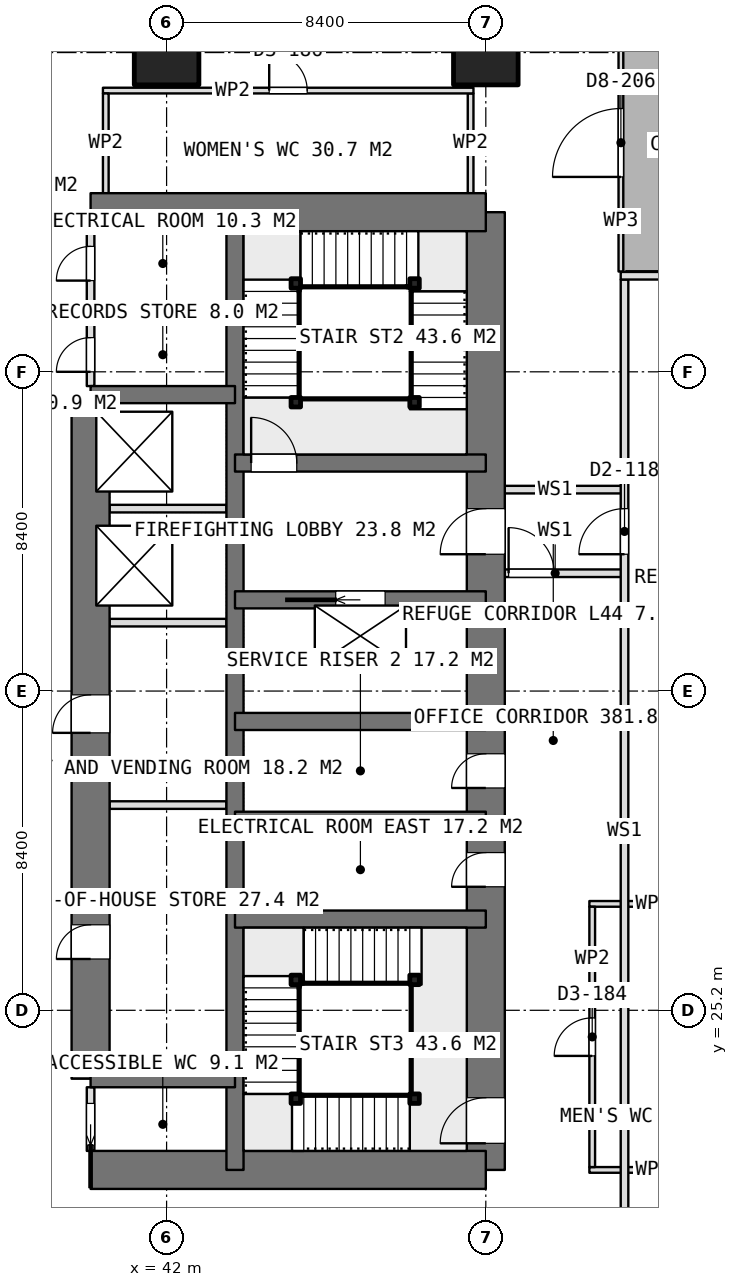
"""IFC4 building model, lengths in metres.
Left out: names, types, materials, properties, quantities, classifications, styles, units other than length and angle.
Written with IfcOpenShell. Run it as: python <this file> out.ifc"""

import sys

from ifc_helpers import new_model, si_unit, direction, frame, frame_2d, origin, origin_2d, place, context, subcontext, project, spatial, rectangle, extrude, element, fill, save


model = new_model("IFC4")
c1 = context("Model", 3, precision=1e-05, world=origin(), true_north=direction((0.0, 1.0)))
c2 = subcontext(c1, "Body", "Model", "MODEL_VIEW")
j1 = project(units=[si_unit("LENGTHUNIT", "METRE"), si_unit("PLANEANGLEUNIT", "RADIAN")], contexts=[c1])
p1 = place(None, origin())
s1 = spatial("IfcSite", under=j1, at=p1, CompositionType="ELEMENT")
p2 = place(p1, origin())
s2 = spatial("IfcBuilding", under=s1, at=p2, CompositionType="ELEMENT")
p3 = place(p2, frame((0.0, 0.0, 176.45)))
s3 = spatial("IfcBuildingStorey", under=s2, at=p3, CompositionType="ELEMENT", Elevation=176.45)
for number, where, z_axis, x_axis in (
    (1, (40.0, 21.0, 0.0), (0.0, 0.0, 1.0), (1.0, 0.0, 0.0)),
    (2, (40.0, 46.2, 0.0), (0.0, 0.0, 1.0), (1.0, 0.0, 0.0)),
):
    element("IfcWall", number, at=place(p3, frame(where, z_axis=z_axis, x_axis=x_axis)), inside=s3, PredefinedType="SHEAR", context=c2, shape_type="SweptSolid", body=[
        extrude(rectangle(XDim=10.4, YDim=1.0, at=frame_2d((5.2, 0.0))), origin(), (0.0, 0.0, 1.0), 3.75),
    ])
p4 = place(p3, frame((50.4, 21.0, 0.0), z_axis=(0.0, 0.0, 1.0), x_axis=(0.0, 1.0, 0.0)))
e3 = element("IfcWall", 3, at=p4, inside=s3, PredefinedType="SHEAR", context=c2, shape_type="SweptSolid", body=[
    extrude(rectangle(XDim=25.2, YDim=1.0, at=frame_2d((12.6, 0.0))), origin(), (0.0, 0.0, 1.0), 3.75),
])
p5 = place(p4, frame((16.2, 0.0, 0.0)))
e4 = element("IfcOpeningElement", 4, at=p5, cuts=e3, PredefinedType="OPENING", context=c2, shape_type="SweptSolid", body=[
    extrude(rectangle(XDim=1.2, YDim=2.1, at=frame_2d((0.6, 1.05))), frame((0.0, 0.51, 0.0), z_axis=(0.0, -1.0, 0.0), x_axis=(1.0, 0.0, 0.0)), (0.0, 0.0, 1.0), 1.02),
])
p6 = place(p4, frame((10.05, 0.0, 0.0)))
e5 = element("IfcOpeningElement", 5, at=p6, cuts=e3, PredefinedType="OPENING", context=c2, shape_type="SweptSolid", body=[
    extrude(rectangle(XDim=0.9, YDim=2.1, at=frame_2d((0.45, 1.05))), frame((0.0, 0.51, 0.0), z_axis=(0.0, -1.0, 0.0), x_axis=(1.0, 0.0, 0.0)), (0.0, 0.0, 1.0), 1.02),
])
p7 = place(p4, frame((7.45, 0.0, 0.0)))
e6 = element("IfcOpeningElement", 6, at=p7, cuts=e3, PredefinedType="OPENING", context=c2, shape_type="SweptSolid", body=[
    extrude(rectangle(XDim=0.9, YDim=2.1, at=frame_2d((0.45, 1.05))), frame((0.0, 0.51, 0.0), z_axis=(0.0, -1.0, 0.0), x_axis=(1.0, 0.0, 0.0)), (0.0, 0.0, 1.0), 1.02),
])
p8 = place(p4, frame((0.7, 0.0, 0.0)))
e7 = element("IfcOpeningElement", 7, at=p8, cuts=e3, PredefinedType="OPENING", context=c2, shape_type="SweptSolid", body=[
    extrude(rectangle(XDim=1.2, YDim=2.1, at=frame_2d((0.6, 1.05))), frame((0.0, 0.51, 0.0), z_axis=(0.0, -1.0, 0.0), x_axis=(1.0, 0.0, 0.0)), (0.0, 0.0, 1.0), 1.02),
])
p9 = place(p3, frame((43.8, 21.0, 0.0), z_axis=(0.0, 0.0, 1.0), x_axis=(0.0, 1.0, 0.0)))
e8 = element("IfcWall", 8, at=p9, inside=s3, PredefinedType="SHEAR", context=c2, shape_type="SweptSolid", body=[
    extrude(rectangle(XDim=25.2, YDim=0.45, at=frame_2d((12.6, 0.0))), origin(), (0.0, 0.0, 1.0), 3.75),
])
p10 = place(p3, frame((40.0, 23.4, 0.0), z_axis=(0.0, 0.0, 1.0), x_axis=(0.0, 1.0, 0.0)))
e9 = element("IfcWall", 9, at=p10, inside=s3, PredefinedType="SHEAR", context=c2, shape_type="SweptSolid", body=[
    extrude(rectangle(XDim=18.0, YDim=1.0, at=frame_2d((9.0, 0.0))), origin(), (0.0, 0.0, 1.0), 3.75),
])
p11 = place(p10, frame((3.15, 0.0, 0.0)))
e10 = element("IfcOpeningElement", 10, at=p11, cuts=e9, PredefinedType="OPENING", context=c2, shape_type="SweptSolid", body=[
    extrude(rectangle(XDim=0.9, YDim=2.1, at=frame_2d((0.45, 1.05))), frame((0.0, 0.51, 0.0), z_axis=(0.0, -1.0, 0.0), x_axis=(1.0, 0.0, 0.0)), (0.0, 0.0, 1.0), 1.02),
])
p12 = place(p10, frame((9.1, 0.0, 0.0)))
e11 = element("IfcOpeningElement", 11, at=p12, cuts=e9, PredefinedType="OPENING", context=c2, shape_type="SweptSolid", body=[
    extrude(rectangle(XDim=1.0, YDim=2.1, at=frame_2d((0.5, 1.05))), frame((0.0, 0.51, 0.0), z_axis=(0.0, -1.0, 0.0), x_axis=(1.0, 0.0, 0.0)), (0.0, 0.0, 1.0), 1.02),
])
for number, where, z_axis, x_axis in (
    (12, (40.0, 23.4, 0.0), (0.0, 0.0, 1.0), (1.0, 0.0, 0.0)),
    (13, (40.0, 41.4, 0.0), (0.0, 0.0, 1.0), (1.0, 0.0, 0.0)),
):
    element("IfcWall", number, at=place(p3, frame(where, z_axis=z_axis, x_axis=x_axis)), inside=s3, PredefinedType="SHEAR", context=c2, shape_type="SweptSolid", body=[
        extrude(rectangle(XDim=3.8, YDim=0.45, at=frame_2d((1.9, 0.0))), origin(), (0.0, 0.0, 1.0), 3.75),
    ])
for number, where, z_axis, x_axis in (
    (14, (43.8, 27.6, 0.0), (0.0, 0.0, 1.0), (1.0, 0.0, 0.0)),
    (15, (43.8, 30.2, 0.0), (0.0, 0.0, 1.0), (1.0, 0.0, 0.0)),
    (16, (43.8, 32.8, 0.0), (0.0, 0.0, 1.0), (1.0, 0.0, 0.0)),
):
    element("IfcWall", number, at=place(p3, frame(where, z_axis=z_axis, x_axis=x_axis)), inside=s3, PredefinedType="SHEAR", context=c2, shape_type="SweptSolid", body=[
        extrude(rectangle(XDim=6.6, YDim=0.45, at=frame_2d((3.3, 0.0))), origin(), (0.0, 0.0, 1.0), 3.75),
    ])
p13 = place(p3, frame((43.8, 36.0, 0.0), z_axis=(0.0, 0.0, 1.0), x_axis=(1.0, 0.0, 0.0)))
e17 = element("IfcWall", 17, at=p13, inside=s3, PredefinedType="SHEAR", context=c2, shape_type="SweptSolid", body=[
    extrude(rectangle(XDim=6.6, YDim=0.45, at=frame_2d((3.3, 0.0))), origin(), (0.0, 0.0, 1.0), 3.75),
])
p14 = place(p13, frame((2.65, 0.0, 0.0)))
e18 = element("IfcOpeningElement", 18, at=p14, cuts=e17, PredefinedType="OPENING", context=c2, shape_type="SweptSolid", body=[
    extrude(rectangle(XDim=1.3, YDim=2.1, at=frame_2d((0.65, 1.05))), frame((0.0, 0.235, 0.0), z_axis=(0.0, -1.0, 0.0), x_axis=(1.0, 0.0, 0.0)), (0.0, 0.0, 1.0), 0.47),
])
p15 = place(p3, frame((43.8, 39.6, 0.0), z_axis=(0.0, 0.0, 1.0), x_axis=(1.0, 0.0, 0.0)))
e19 = element("IfcWall", 19, at=p15, inside=s3, PredefinedType="SHEAR", context=c2, shape_type="SweptSolid", body=[
    extrude(rectangle(XDim=6.6, YDim=0.45, at=frame_2d((3.3, 0.0))), origin(), (0.0, 0.0, 1.0), 3.75),
])
p16 = place(p15, frame((0.425, 0.0, 0.0)))
e20 = element("IfcOpeningElement", 20, at=p16, cuts=e19, PredefinedType="OPENING", context=c2, shape_type="SweptSolid", body=[
    extrude(rectangle(XDim=1.2, YDim=2.1, at=frame_2d((0.6, 1.05))), frame((0.0, 0.235, 0.0), z_axis=(0.0, -1.0, 0.0), x_axis=(1.0, 0.0, 0.0)), (0.0, 0.0, 1.0), 0.47),
])
for number, where, z_axis, x_axis in (
    (21, (42.0, 50.4, 0.0), (0.0, 0.0, 1.0), (1.0, 0.0, 0.0)),
    (22, (50.4, 50.4, 0.0), (0.0, 0.0, 1.0), (1.0, 0.0, 0.0)),
):
    element("IfcColumn", number, at=place(p3, frame(where, z_axis=z_axis, x_axis=x_axis)), inside=s3, PredefinedType="COLUMN", context=c2, shape_type="SweptSolid", body=[
        extrude(rectangle(XDim=1.7, YDim=1.7, at=origin_2d()), origin(), (0.0, 0.0, 1.0), 3.75),
    ])
for number, where, z_axis, x_axis in (
    (23, (40.5, 35.4, 0.0), (0.0, 0.0, 1.0), (1.0, 0.0, 0.0)),
    (24, (40.5, 38.4, 0.0), (0.0, 0.0, 1.0), (1.0, 0.0, 0.0)),
):
    element("IfcWall", number, at=place(p3, frame(where, z_axis=z_axis, x_axis=x_axis)), inside=s3, PredefinedType="PARTITIONING", context=c2, shape_type="SweptSolid", body=[
        extrude(rectangle(XDim=3.075, YDim=0.2, at=frame_2d((1.538, 0.0))), origin(), (0.0, 0.0, 1.0), 3.5),
    ])
p17 = place(p3, frame((40.0, 21.5, 0.0), z_axis=(0.0, 0.0, 1.0), x_axis=(0.0, 1.0, 0.0)))
e25 = element("IfcWall", 25, at=p17, inside=s3, PredefinedType="PARTITIONING", context=c2, shape_type="SweptSolid", body=[
    extrude(rectangle(XDim=1.675, YDim=0.2, at=frame_2d((0.837, 0.0))), origin(), (0.0, 0.0, 1.0), 3.5),
])
p18 = place(p17, frame((0.15, 0.0, 0.0)))
e26 = element("IfcOpeningElement", 26, at=p18, cuts=e25, PredefinedType="OPENING", context=c2, shape_type="SweptSolid", body=[
    extrude(rectangle(XDim=1.1, YDim=2.1, at=frame_2d((0.55, 1.05))), frame((0.0, 0.11, 0.0), z_axis=(0.0, -1.0, 0.0), x_axis=(1.0, 0.0, 0.0)), (0.0, 0.0, 1.0), 0.22),
])
p19 = place(p3, frame((40.0, 41.625, 0.0), z_axis=(0.0, 0.0, 1.0), x_axis=(0.0, 1.0, 0.0)))
e27 = element("IfcWall", 27, at=p19, inside=s3, PredefinedType="PARTITIONING", context=c2, shape_type="SweptSolid", body=[
    extrude(rectangle(XDim=4.075, YDim=0.2, at=frame_2d((2.038, 0.0))), origin(), (0.0, 0.0, 1.0), 3.5),
])
p20 = place(p19, frame((2.775, 0.0, 0.0)))
e28 = element("IfcOpeningElement", 28, at=p20, cuts=e27, PredefinedType="OPENING", context=c2, shape_type="SweptSolid", body=[
    extrude(rectangle(XDim=0.9, YDim=2.1, at=frame_2d((0.45, 1.05))), frame((0.0, 0.11, 0.0), z_axis=(0.0, -1.0, 0.0), x_axis=(1.0, 0.0, 0.0)), (0.0, 0.0, 1.0), 0.22),
])
p21 = place(p19, frame((0.375, 0.0, 0.0)))
e29 = element("IfcOpeningElement", 29, at=p21, cuts=e27, PredefinedType="OPENING", context=c2, shape_type="SweptSolid", body=[
    extrude(rectangle(XDim=0.9, YDim=2.1, at=frame_2d((0.45, 1.05))), frame((0.0, 0.11, 0.0), z_axis=(0.0, -1.0, 0.0), x_axis=(1.0, 0.0, 0.0)), (0.0, 0.0, 1.0), 0.22),
])
p22 = place(p3, frame((40.5, 30.6, 0.0), z_axis=(0.0, 0.0, 1.0), x_axis=(1.0, 0.0, 0.0)))
e30 = element("IfcWall", 30, at=p22, inside=s3, PredefinedType="PARTITIONING", context=c2, shape_type="SweptSolid", body=[
    extrude(rectangle(XDim=3.075, YDim=0.2, at=frame_2d((1.538, 0.0))), origin(), (0.0, 0.0, 1.0), 3.5),
])
p23 = place(p3, frame((40.0, 43.5, 0.0), z_axis=(0.0, 0.0, 1.0), x_axis=(1.0, 0.0, 0.0)))
e31 = element("IfcWall", 31, at=p23, inside=s3, PredefinedType="PARTITIONING", context=c2, shape_type="SweptSolid", body=[
    extrude(rectangle(XDim=3.575, YDim=0.2, at=frame_2d((1.788, 0.0))), origin(), (0.0, 0.0, 1.0), 3.5),
])
p24 = place(p3, frame((40.325, 49.4, 0.0), z_axis=(0.0, 0.0, 1.0), x_axis=(1.0, 0.0, 0.0)))
e32 = element("IfcWall", 32, at=p24, inside=s3, PredefinedType="PARTITIONING", context=c2, shape_type="SweptSolid", body=[
    extrude(rectangle(XDim=9.75, YDim=0.15, at=frame_2d((4.875, 0.0))), origin(), (0.0, 0.0, 1.0), 3.5),
])
p25 = place(p24, frame((4.375, 0.0, 0.0)))
e33 = element("IfcOpeningElement", 33, at=p25, cuts=e32, PredefinedType="OPENING", context=c2, shape_type="SweptSolid", body=[
    extrude(rectangle(XDim=1.0, YDim=2.1, at=frame_2d((0.5, 1.05))), frame((0.0, 0.085, 0.0), z_axis=(0.0, -1.0, 0.0), x_axis=(1.0, 0.0, 0.0)), (0.0, 0.0, 1.0), 0.17),
])
for number, where, z_axis, x_axis in (
    (34, (40.4, 46.7, 0.0), (0.0, 0.0, 1.0), (0.0, 1.0, 0.0)),
    (35, (50.0, 46.7, 0.0), (0.0, 0.0, 1.0), (0.0, 1.0, 0.0)),
):
    element("IfcWall", number, at=place(p3, frame(where, z_axis=z_axis, x_axis=x_axis)), inside=s3, PredefinedType="PARTITIONING", context=c2, shape_type="SweptSolid", body=[
        extrude(rectangle(XDim=2.625, YDim=0.15, at=frame_2d((1.312, 0.0))), origin(), (0.0, 0.0, 1.0), 3.5),
    ])
for number, where, z_axis, x_axis in (
    (36, (53.125, 21.0, 0.0), (0.0, 0.0, 1.0), (1.0, 0.0, 0.0)),
    (37, (53.125, 28.0, 0.0), (0.0, 0.0, 1.0), (1.0, 0.0, 0.0)),
):
    element("IfcWall", number, at=place(p3, frame(where, z_axis=z_axis, x_axis=x_axis)), inside=s3, PredefinedType="PARTITIONING", context=c2, shape_type="SweptSolid", body=[
        extrude(rectangle(XDim=3.35, YDim=0.15, at=frame_2d((1.675, 0.0))), origin(), (0.0, 0.0, 1.0), 3.5),
    ])
p26 = place(p3, frame((53.2, 21.075, 0.0), z_axis=(0.0, 0.0, 1.0), x_axis=(0.0, 1.0, 0.0)))
e38 = element("IfcWall", 38, at=p26, inside=s3, PredefinedType="PARTITIONING", context=c2, shape_type="SweptSolid", body=[
    extrude(rectangle(XDim=6.85, YDim=0.15, at=frame_2d((3.425, 0.0))), origin(), (0.0, 0.0, 1.0), 3.5),
])
p27 = place(p26, frame((2.925, 0.0, 0.0)))
e39 = element("IfcOpeningElement", 39, at=p27, cuts=e38, PredefinedType="OPENING", context=c2, shape_type="SweptSolid", body=[
    extrude(rectangle(XDim=1.0, YDim=2.1, at=frame_2d((0.5, 1.05))), frame((0.0, 0.085, 0.0), z_axis=(0.0, -1.0, 0.0), x_axis=(1.0, 0.0, 0.0)), (0.0, 0.0, 1.0), 0.17),
])
p28 = place(p3, frame((53.955, 44.639, 0.0), z_axis=(0.0, 0.0, 1.0), x_axis=(0.0, 1.0, 0.0)))
e40 = element("IfcWall", 40, at=p28, inside=s3, PredefinedType="PARTITIONING", context=c2, shape_type="SweptSolid", body=[
    extrude(rectangle(XDim=6.637, YDim=0.125, at=frame_2d((3.318, 0.0))), origin(), (0.0, 0.0, 1.0), 3.5),
])
p29 = place(p28, frame((2.489, 0.0, 0.0)))
e41 = element("IfcOpeningElement", 41, at=p29, cuts=e40, PredefinedType="OPENING", context=c2, shape_type="SweptSolid", body=[
    extrude(rectangle(XDim=1.8, YDim=2.1, at=frame_2d((0.9, 1.05))), frame((0.0, 0.073, 0.0), z_axis=(0.0, -1.0, 0.0), x_axis=(1.0, 0.0, 0.0)), (0.0, 0.0, 1.0), 0.145),
])
for number, where, z_axis, x_axis in (
    (42, (45.4, 41.2, 0.0), (0.0, 0.0, 1.0), (1.0, 0.0, 0.0)),
    (43, (45.4, 44.325, 0.0), (0.0, 0.0, 1.0), (1.0, 0.0, 0.0)),
    (44, (48.525, 44.325, 0.0), (0.0, 0.0, 1.0), (1.0, 0.0, 0.0)),
    (45, (48.525, 41.2, 0.0), (0.0, 0.0, 1.0), (1.0, 0.0, 0.0)),
    (46, (48.525, 22.875, 0.0), (0.0, 0.0, 1.0), (1.0, 0.0, 0.0)),
    (47, (45.4, 22.875, 0.0), (0.0, 0.0, 1.0), (1.0, 0.0, 0.0)),
    (48, (45.4, 26.0, 0.0), (0.0, 0.0, 1.0), (1.0, 0.0, 0.0)),
    (49, (48.525, 26.0, 0.0), (0.0, 0.0, 1.0), (1.0, 0.0, 0.0)),
):
    element("IfcColumn", number, at=place(p3, frame(where, z_axis=z_axis, x_axis=x_axis)), inside=s3, PredefinedType="COLUMN", context=c2, shape_type="SweptSolid", body=[
        extrude(rectangle(XDim=0.25, YDim=0.25, at=origin_2d()), origin(), (0.0, 0.0, 1.0), 3.75),
    ])
p30 = place(p3, frame((54.05, 15.397, 0.0), z_axis=(0.0, 0.0, 1.0), x_axis=(0.0, 1.0, 0.0)))
e50 = element("IfcWall", 50, at=p30, inside=s3, PredefinedType="PARTITIONING", context=c2, shape_type="SweptSolid", body=[
    extrude(rectangle(XDim=29.031, YDim=0.2, at=frame_2d((14.516, 0.0))), origin(), (0.0, 0.0, 1.0), 3.5),
])
p31 = place(p30, frame((21.803, 0.0, 0.0)))
e51 = element("IfcOpeningElement", 51, at=p31, cuts=e50, PredefinedType="OPENING", context=c2, shape_type="SweptSolid", body=[
    extrude(rectangle(XDim=1.2, YDim=2.1, at=frame_2d((0.6, 1.05))), frame((0.0, 0.11, 0.0), z_axis=(0.0, -1.0, 0.0), x_axis=(1.0, 0.0, 0.0)), (0.0, 0.0, 1.0), 0.22),
])
p32 = place(p3, frame((53.95, 44.528, 0.0), z_axis=(0.0, 0.0, 1.0), x_axis=(1.0, 0.0, 0.0)))
e52 = element("IfcWall", 52, at=p32, inside=s3, PredefinedType="PARTITIONING", context=c2, shape_type="SweptSolid", body=[
    extrude(rectangle(XDim=7.304, YDim=0.2, at=frame_2d((3.652, 0.0))), origin(), (0.0, 0.0, 1.0), 3.5),
])
p33 = place(p3, frame((50.4, 38.9, 0.0), z_axis=(0.0, 0.0, 1.0), x_axis=(1.0, 0.0, 0.0)))
e53 = element("IfcWall", 53, at=p33, inside=s3, PredefinedType="PARTITIONING", context=c2, shape_type="SweptSolid", body=[
    extrude(rectangle(XDim=3.65, YDim=0.2, at=frame_2d((1.825, 0.0))), origin(), (0.0, 0.0, 1.0), 3.5),
])
p34 = place(p3, frame((50.4, 36.7, 0.0), z_axis=(0.0, 0.0, 1.0), x_axis=(1.0, 0.0, 0.0)))
e54 = element("IfcWall", 54, at=p34, inside=s3, PredefinedType="PARTITIONING", context=c2, shape_type="SweptSolid", body=[
    extrude(rectangle(XDim=3.65, YDim=0.2, at=frame_2d((1.825, 0.0))), origin(), (0.0, 0.0, 1.0), 3.5),
])
p35 = place(p34, frame((0.6, 0.0, 0.0)))
e55 = element("IfcOpeningElement", 55, at=p35, cuts=e54, PredefinedType="OPENING", context=c2, shape_type="SweptSolid", body=[
    extrude(rectangle(XDim=1.2, YDim=2.1, at=frame_2d((0.6, 1.05))), frame((0.0, 0.11, 0.0), z_axis=(0.0, -1.0, 0.0), x_axis=(1.0, 0.0, 0.0)), (0.0, 0.0, 1.0), 0.22),
])
p36 = place(p5, origin())
e56 = element("IfcDoor", 56, at=p36, inside=s3, OperationType="SINGLE_SWING_LEFT", PredefinedType="DOOR", context=c2, shape_type="SweptSolid", body=[
    extrude(rectangle(XDim=1.2, YDim=2.1, at=frame_2d((0.6, 1.05))), frame((0.0, 0.025, 0.0), z_axis=(0.0, -1.0, 0.0), x_axis=(1.0, 0.0, 0.0)), (0.0, 0.0, 1.0), 0.05),
])
fill(e4, e56)
p37 = place(p6, origin())
e57 = element("IfcDoor", 57, at=p37, inside=s3, OperationType="SINGLE_SWING_LEFT", PredefinedType="DOOR", context=c2, shape_type="SweptSolid", body=[
    extrude(rectangle(XDim=0.9, YDim=2.1, at=frame_2d((0.45, 1.05))), frame((0.0, 0.025, 0.0), z_axis=(0.0, -1.0, 0.0), x_axis=(1.0, 0.0, 0.0)), (0.0, 0.0, 1.0), 0.05),
])
fill(e5, e57)
p38 = place(p7, origin())
e58 = element("IfcDoor", 58, at=p38, inside=s3, OperationType="SINGLE_SWING_LEFT", PredefinedType="DOOR", context=c2, shape_type="SweptSolid", body=[
    extrude(rectangle(XDim=0.9, YDim=2.1, at=frame_2d((0.45, 1.05))), frame((0.0, 0.025, 0.0), z_axis=(0.0, -1.0, 0.0), x_axis=(1.0, 0.0, 0.0)), (0.0, 0.0, 1.0), 0.05),
])
fill(e6, e58)
p39 = place(p18, origin())
e59 = element("IfcDoor", 59, at=p39, inside=s3, OperationType="SLIDING_TO_LEFT", PredefinedType="DOOR", context=c2, shape_type="SweptSolid", body=[
    extrude(rectangle(XDim=1.1, YDim=2.1, at=frame_2d((0.55, 1.05))), frame((0.0, 0.025, 0.0), z_axis=(0.0, -1.0, 0.0), x_axis=(1.0, 0.0, 0.0)), (0.0, 0.0, 1.0), 0.05),
])
fill(e26, e59)
p40 = place(p20, origin())
e60 = element("IfcDoor", 60, at=p40, inside=s3, OperationType="SINGLE_SWING_LEFT", PredefinedType="DOOR", context=c2, shape_type="SweptSolid", body=[
    extrude(rectangle(XDim=0.9, YDim=2.1, at=frame_2d((0.45, 1.05))), frame((0.0, 0.025, 0.0), z_axis=(0.0, -1.0, 0.0), x_axis=(1.0, 0.0, 0.0)), (0.0, 0.0, 1.0), 0.05),
])
fill(e28, e60)
p41 = place(p21, origin())
e61 = element("IfcDoor", 61, at=p41, inside=s3, OperationType="SINGLE_SWING_LEFT", PredefinedType="DOOR", context=c2, shape_type="SweptSolid", body=[
    extrude(rectangle(XDim=0.9, YDim=2.1, at=frame_2d((0.45, 1.05))), frame((0.0, 0.025, 0.0), z_axis=(0.0, -1.0, 0.0), x_axis=(1.0, 0.0, 0.0)), (0.0, 0.0, 1.0), 0.05),
])
fill(e29, e61)
p42 = place(p11, origin())
e62 = element("IfcDoor", 62, at=p42, inside=s3, OperationType="SINGLE_SWING_LEFT", PredefinedType="DOOR", context=c2, shape_type="SweptSolid", body=[
    extrude(rectangle(XDim=0.9, YDim=2.1, at=frame_2d((0.45, 1.05))), frame((0.0, 0.025, 0.0), z_axis=(0.0, -1.0, 0.0), x_axis=(1.0, 0.0, 0.0)), (0.0, 0.0, 1.0), 0.05),
])
fill(e10, e62)
p43 = place(p12, origin())
e63 = element("IfcDoor", 63, at=p43, inside=s3, OperationType="SINGLE_SWING_LEFT", PredefinedType="DOOR", context=c2, shape_type="SweptSolid", body=[
    extrude(rectangle(XDim=1.0, YDim=2.1, at=frame_2d((0.5, 1.05))), frame((0.0, 0.025, 0.0), z_axis=(0.0, -1.0, 0.0), x_axis=(1.0, 0.0, 0.0)), (0.0, 0.0, 1.0), 0.05),
])
fill(e11, e63)
p44 = place(p14, origin())
e64 = element("IfcDoor", 64, at=p44, inside=s3, OperationType="SLIDING_TO_LEFT", PredefinedType="USERDEFINED", context=c2, shape_type="SweptSolid", body=[
    extrude(rectangle(XDim=1.3, YDim=2.1, at=frame_2d((0.65, 1.05))), frame((0.0, 0.025, 0.0), z_axis=(0.0, -1.0, 0.0), x_axis=(1.0, 0.0, 0.0)), (0.0, 0.0, 1.0), 0.05),
])
fill(e18, e64)
p45 = place(p25, origin())
e65 = element("IfcDoor", 65, at=p45, inside=s3, OperationType="SINGLE_SWING_LEFT", PredefinedType="DOOR", context=c2, shape_type="SweptSolid", body=[
    extrude(rectangle(XDim=1.0, YDim=2.1, at=frame_2d((0.5, 1.05))), frame((0.0, 0.025, 0.0), z_axis=(0.0, -1.0, 0.0), x_axis=(1.0, 0.0, 0.0)), (0.0, 0.0, 1.0), 0.05),
])
fill(e33, e65)
p46 = place(p27, origin())
e66 = element("IfcDoor", 66, at=p46, inside=s3, OperationType="SINGLE_SWING_LEFT", PredefinedType="DOOR", context=c2, shape_type="SweptSolid", body=[
    extrude(rectangle(XDim=1.0, YDim=2.1, at=frame_2d((0.5, 1.05))), frame((0.0, 0.025, 0.0), z_axis=(0.0, -1.0, 0.0), x_axis=(1.0, 0.0, 0.0)), (0.0, 0.0, 1.0), 0.05),
])
fill(e39, e66)
p47 = place(p29, origin())
e67 = element("IfcDoor", 67, at=p47, inside=s3, OperationType="DOUBLE_DOOR_SINGLE_SWING", PredefinedType="DOOR", context=c2, shape_type="SweptSolid", body=[
    extrude(rectangle(XDim=1.8, YDim=2.1, at=frame_2d((0.9, 1.05))), frame((0.0, 0.025, 0.0), z_axis=(0.0, -1.0, 0.0), x_axis=(1.0, 0.0, 0.0)), (0.0, 0.0, 1.0), 0.05),
])
fill(e41, e67)
p48 = place(p16, origin())
e68 = element("IfcDoor", 68, at=p48, inside=s3, OperationType="SINGLE_SWING_RIGHT", PredefinedType="DOOR", context=c2, shape_type="SweptSolid", body=[
    extrude(rectangle(XDim=1.2, YDim=2.1, at=frame_2d((0.6, 1.05))), frame((0.0, 0.025, 0.0), z_axis=(0.0, -1.0, 0.0), x_axis=(1.0, 0.0, 0.0)), (0.0, 0.0, 1.0), 0.05),
])
fill(e20, e68)
p49 = place(p8, origin())
e69 = element("IfcDoor", 69, at=p49, inside=s3, OperationType="SINGLE_SWING_RIGHT", PredefinedType="DOOR", context=c2, shape_type="SweptSolid", body=[
    extrude(rectangle(XDim=1.2, YDim=2.1, at=frame_2d((0.6, 1.05))), frame((0.0, 0.025, 0.0), z_axis=(0.0, -1.0, 0.0), x_axis=(1.0, 0.0, 0.0)), (0.0, 0.0, 1.0), 0.05),
])
fill(e7, e69)
p50 = place(p31, origin())
e70 = element("IfcDoor", 70, at=p50, inside=s3, OperationType="SINGLE_SWING_LEFT", PredefinedType="DOOR", context=c2, shape_type="SweptSolid", body=[
    extrude(rectangle(XDim=1.2, YDim=2.1, at=frame_2d((0.6, 1.05))), frame((0.0, 0.025, 0.0), z_axis=(0.0, -1.0, 0.0), x_axis=(1.0, 0.0, 0.0)), (0.0, 0.0, 1.0), 0.05),
])
fill(e51, e70)
p51 = place(p35, origin())
e71 = element("IfcDoor", 71, at=p51, inside=s3, OperationType="SINGLE_SWING_LEFT", PredefinedType="DOOR", context=c2, shape_type="SweptSolid", body=[
    extrude(rectangle(XDim=1.2, YDim=2.1, at=frame_2d((0.6, 1.05))), frame((0.0, 0.025, 0.0), z_axis=(0.0, -1.0, 0.0), x_axis=(1.0, 0.0, 0.0)), (0.0, 0.0, 1.0), 0.05),
])
fill(e55, e71)
save(model, sys.argv[1])
